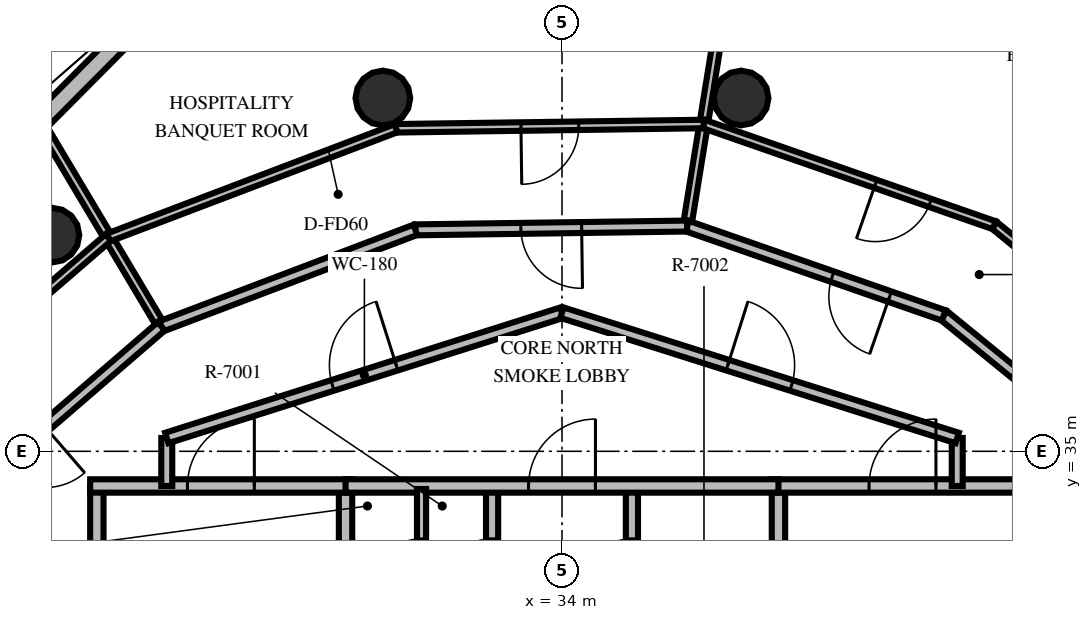
"""IFC4 building model, lengths in metres.
Left out: names, types, materials, properties, quantities, classifications, styles, units other than length and angle.
Written with IfcOpenShell. Run it as: python <this file> out.ifc"""

import sys

from ifc_helpers import new_model, si_unit, direction, frame, frame_2d, origin, origin_2d, place, context, subcontext, project, spatial, rectangle, circle, extrude, element, fill, save


model = new_model("IFC4")
c1 = context("Model", 3, precision=1e-05, world=origin(), true_north=direction((0.0, 1.0)))
c2 = subcontext(c1, "Body", "Model", "MODEL_VIEW")
j1 = project(units=[si_unit("LENGTHUNIT", "METRE"), si_unit("PLANEANGLEUNIT", "RADIAN")], contexts=[c1])
p1 = place(None, origin())
s1 = spatial("IfcSite", under=j1, at=p1, CompositionType="ELEMENT")
p2 = place(p1, origin())
s2 = spatial("IfcBuilding", under=s1, at=p2, CompositionType="ELEMENT")
p3 = place(p2, frame((0.0, 0.0, 280.8)))
s3 = spatial("IfcBuildingStorey", under=s2, at=p3, CompositionType="ELEMENT", Elevation=280.8)
for number, where, z_axis, x_axis in (
    (1, (36.946, 40.81, 0.0), (0.0, 0.0, 1.0), (1.0, 0.0, 0.0)),
    (2, (31.054, 40.81, 0.0), (0.0, 0.0, 1.0), (1.0, 0.0, 0.0)),
    (3, (25.611, 38.555, 0.0), (0.0, 0.0, 1.0), (1.0, 0.0, 0.0)),
):
    element("IfcColumn", number, at=place(p3, frame(where, z_axis=z_axis, x_axis=x_axis)), inside=s3, PredefinedType="COLUMN", context=c2, shape_type="SweptSolid", body=[
        extrude(circle(Radius=0.45, at=origin_2d()), origin(), (0.0, 0.0, 1.0), 3.6),
    ])
p4 = place(p3, frame((26.951, 41.968, 0.0), z_axis=(0.0, 0.0, 1.0), x_axis=(-0.704528696966, -0.709675499895, 0.0)))
e4 = element("IfcWall", 4, at=p4, inside=s3, PredefinedType="SOLIDWALL", context=c2, shape_type="SweptSolid", body=[
    extrude(rectangle(XDim=7.115, YDim=0.3, at=frame_2d((3.558, 0.0))), origin(), (0.0, 0.0, 1.0), 2.76),
])
p5 = place(p4, frame((2.508, 0.0, 0.8)))
e5 = element("IfcOpeningElement", 5, at=p5, cuts=e4, PredefinedType="OPENING", context=c2, shape_type="SweptSolid", body=[
    extrude(rectangle(XDim=2.1, YDim=1.85, at=frame_2d((1.05, 0.925))), frame((0.0, 0.16, 0.0), z_axis=(0.0, -1.0, 0.0), x_axis=(1.0, 0.0, 0.0)), (0.0, 0.0, 1.0), 0.32),
])
p6 = place(p3, frame((26.35, 30.05, 0.0), z_axis=(0.0, 0.0, 1.0), x_axis=(0.0, 1.0, 0.0)))
e6 = element("IfcWall", 6, at=p6, inside=s3, PredefinedType="SOLIDWALL", context=c2, shape_type="SweptSolid", body=[
    extrude(rectangle(XDim=4.38, YDim=0.22, at=frame_2d((2.19, 0.0))), origin(), (0.0, 0.0, 1.0), 2.46),
])
p7 = place(p3, frame((30.44, 30.05, 0.0), z_axis=(0.0, 0.0, 1.0), x_axis=(0.0, 1.0, 0.0)))
e7 = element("IfcWall", 7, at=p7, inside=s3, PredefinedType="SOLIDWALL", context=c2, shape_type="SweptSolid", body=[
    extrude(rectangle(XDim=4.38, YDim=0.22, at=frame_2d((2.19, 0.0))), origin(), (0.0, 0.0, 1.0), 2.46),
])
p8 = place(p7, frame((0.8, 0.0, 0.0)))
e8 = element("IfcOpeningElement", 8, at=p8, cuts=e7, PredefinedType="OPENING", context=c2, shape_type="SweptSolid", body=[
    extrude(rectangle(XDim=1.05, YDim=2.1, at=frame_2d((0.525, 1.05))), frame((0.0, 0.12, 0.0), z_axis=(0.0, -1.0, 0.0), x_axis=(1.0, 0.0, 0.0)), (0.0, 0.0, 1.0), 0.24),
])
p9 = place(p3, frame((26.24, 34.43, 0.0), z_axis=(0.0, 0.0, 1.0), x_axis=(1.0, 0.0, 0.0)))
e9 = element("IfcWall", 9, at=p9, inside=s3, PredefinedType="SOLIDWALL", context=c2, shape_type="SweptSolid", body=[
    extrude(rectangle(XDim=4.31, YDim=0.22, at=frame_2d((2.155, 0.0))), origin(), (0.0, 0.0, 1.0), 2.46),
])
p10 = place(p9, frame((1.6, 0.0, 0.0)))
e10 = element("IfcOpeningElement", 10, at=p10, cuts=e9, PredefinedType="OPENING", context=c2, shape_type="SweptSolid", body=[
    extrude(rectangle(XDim=1.1, YDim=2.15, at=frame_2d((0.55, 1.075))), frame((0.0, 0.12, 0.0), z_axis=(0.0, -1.0, 0.0), x_axis=(1.0, 0.0, 0.0)), (0.0, 0.0, 1.0), 0.24),
])
p11 = place(p3, frame((32.85, 30.05, 0.0), z_axis=(0.0, 0.0, 1.0), x_axis=(0.0, 1.0, 0.0)))
e11 = element("IfcWall", 11, at=p11, inside=s3, PredefinedType="SOLIDWALL", context=c2, shape_type="SweptSolid", body=[
    extrude(rectangle(XDim=4.38, YDim=0.2, at=frame_2d((2.19, 0.0))), origin(), (0.0, 0.0, 1.0), 2.46),
])
p12 = place(p11, frame((2.65, 0.0, 0.0)))
e12 = element("IfcOpeningElement", 12, at=p12, cuts=e11, PredefinedType="OPENING", context=c2, shape_type="SweptSolid", body=[
    extrude(rectangle(XDim=0.86, YDim=2.05, at=frame_2d((0.43, 1.025))), frame((0.0, 0.11, 0.0), z_axis=(0.0, -1.0, 0.0), x_axis=(1.0, 0.0, 0.0)), (0.0, 0.0, 1.0), 0.22),
])
p13 = place(p3, frame((37.56, 30.05, 0.0), z_axis=(0.0, 0.0, 1.0), x_axis=(0.0, 1.0, 0.0)))
e13 = element("IfcWall", 13, at=p13, inside=s3, PredefinedType="SOLIDWALL", context=c2, shape_type="SweptSolid", body=[
    extrude(rectangle(XDim=4.38, YDim=0.22, at=frame_2d((2.19, 0.0))), origin(), (0.0, 0.0, 1.0), 2.46),
])
p14 = place(p13, frame((0.8, 0.0, 0.0)))
e14 = element("IfcOpeningElement", 14, at=p14, cuts=e13, PredefinedType="OPENING", context=c2, shape_type="SweptSolid", body=[
    extrude(rectangle(XDim=1.05, YDim=2.1, at=frame_2d((0.525, 1.05))), frame((0.0, 0.12, 0.0), z_axis=(0.0, -1.0, 0.0), x_axis=(1.0, 0.0, 0.0)), (0.0, 0.0, 1.0), 0.24),
])
p15 = place(p3, frame((37.45, 34.43, 0.0), z_axis=(0.0, 0.0, 1.0), x_axis=(1.0, 0.0, 0.0)))
e15 = element("IfcWall", 15, at=p15, inside=s3, PredefinedType="SOLIDWALL", context=c2, shape_type="SweptSolid", body=[
    extrude(rectangle(XDim=4.31, YDim=0.22, at=frame_2d((2.155, 0.0))), origin(), (0.0, 0.0, 1.0), 2.46),
])
p16 = place(p15, frame((1.6, 0.0, 0.0)))
e16 = element("IfcOpeningElement", 16, at=p16, cuts=e15, PredefinedType="OPENING", context=c2, shape_type="SweptSolid", body=[
    extrude(rectangle(XDim=1.1, YDim=2.15, at=frame_2d((0.55, 1.075))), frame((0.0, 0.12, 0.0), z_axis=(0.0, -1.0, 0.0), x_axis=(1.0, 0.0, 0.0)), (0.0, 0.0, 1.0), 0.24),
])
p17 = place(p3, frame((35.15, 30.05, 0.0), z_axis=(0.0, 0.0, 1.0), x_axis=(0.0, 1.0, 0.0)))
e17 = element("IfcWall", 17, at=p17, inside=s3, PredefinedType="SOLIDWALL", context=c2, shape_type="SweptSolid", body=[
    extrude(rectangle(XDim=4.38, YDim=0.2, at=frame_2d((2.19, 0.0))), origin(), (0.0, 0.0, 1.0), 2.46),
])
p18 = place(p17, frame((2.65, 0.0, 0.0)))
e18 = element("IfcOpeningElement", 18, at=p18, cuts=e17, PredefinedType="OPENING", context=c2, shape_type="SweptSolid", body=[
    extrude(rectangle(XDim=0.86, YDim=2.05, at=frame_2d((0.43, 1.025))), frame((0.0, 0.11, 0.0), z_axis=(0.0, -1.0, 0.0), x_axis=(1.0, 0.0, 0.0)), (0.0, 0.0, 1.0), 0.22),
])
p19 = place(p3, frame((30.44, 34.43, 0.0), z_axis=(0.0, 0.0, 1.0), x_axis=(1.0, 0.0, 0.0)))
e19 = element("IfcWall", 19, at=p19, inside=s3, PredefinedType="SOLIDWALL", context=c2, shape_type="SweptSolid", body=[
    extrude(rectangle(XDim=7.12, YDim=0.22, at=frame_2d((3.56, 0.0))), origin(), (0.0, 0.0, 1.0), 2.46),
])
p20 = place(p19, frame((3.01, 0.0, 0.0)))
e20 = element("IfcOpeningElement", 20, at=p20, cuts=e19, PredefinedType="OPENING", context=c2, shape_type="SweptSolid", body=[
    extrude(rectangle(XDim=1.1, YDim=2.15, at=frame_2d((0.55, 1.075))), frame((0.0, 0.12, 0.0), z_axis=(0.0, -1.0, 0.0), x_axis=(1.0, 0.0, 0.0)), (0.0, 0.0, 1.0), 0.24),
])
p21 = place(p3, frame((31.69, 32.05, 0.0), z_axis=(0.0, 0.0, 1.0), x_axis=(0.0, 1.0, 0.0)))
e21 = element("IfcWall", 21, at=p21, inside=s3, PredefinedType="PARTITIONING", context=c2, shape_type="SweptSolid", body=[
    extrude(rectangle(XDim=2.33, YDim=0.15, at=frame_2d((1.165, 0.0))), origin(), (0.0, 0.0, 1.0), 2.46),
])
p22 = place(p21, frame((0.65, 0.0, 0.0)))
e22 = element("IfcOpeningElement", 22, at=p22, cuts=e21, PredefinedType="OPENING", context=c2, shape_type="SweptSolid", body=[
    extrude(rectangle(XDim=0.86, YDim=2.05, at=frame_2d((0.43, 1.025))), frame((0.0, 0.085, 0.0), z_axis=(0.0, -1.0, 0.0), x_axis=(1.0, 0.0, 0.0)), (0.0, 0.0, 1.0), 0.17),
])
for number, where, z_axis, x_axis in (
    (23, (27.5, 34.43, 0.0), (0.0, 0.0, 1.0), (0.0, 1.0, 0.0)),
    (24, (40.5, 35.219, 0.0), (0.0, 0.0, 1.0), (0.0, -1.0, 0.0)),
):
    element("IfcWall", number, at=place(p3, frame(where, z_axis=z_axis, x_axis=x_axis)), inside=s3, PredefinedType="PARTITIONING", context=c2, shape_type="SweptSolid", body=[
        extrude(rectangle(XDim=0.789, YDim=0.18, at=frame_2d((0.395, 0.0))), origin(), (0.0, 0.0, 1.0), 2.46),
    ])
p23 = place(p3, frame((27.5, 35.219, 0.0), z_axis=(0.0, 0.0, 1.0), x_axis=(0.953228121756, 0.302251795518, 0.0)))
e25 = element("IfcWall", 25, at=p23, inside=s3, PredefinedType="PARTITIONING", context=c2, shape_type="SweptSolid", body=[
    extrude(rectangle(XDim=6.819, YDim=0.18, at=frame_2d((3.409, 0.0))), origin(), (0.0, 0.0, 1.0), 2.46),
])
p24 = place(p23, frame((2.86, 0.0, 0.0)))
e26 = element("IfcOpeningElement", 26, at=p24, cuts=e25, PredefinedType="OPENING", context=c2, shape_type="SweptSolid", body=[
    extrude(rectangle(XDim=1.1, YDim=2.15, at=frame_2d((0.55, 1.075))), frame((0.0, 0.1, 0.0), z_axis=(0.0, -1.0, 0.0), x_axis=(1.0, 0.0, 0.0)), (0.0, 0.0, 1.0), 0.2),
])
p25 = place(p3, frame((34.0, 37.28, 0.0), z_axis=(0.0, 0.0, 1.0), x_axis=(0.953228121756, -0.302251795518, 0.0)))
e27 = element("IfcWall", 27, at=p25, inside=s3, PredefinedType="PARTITIONING", context=c2, shape_type="SweptSolid", body=[
    extrude(rectangle(XDim=6.819, YDim=0.18, at=frame_2d((3.409, 0.0))), origin(), (0.0, 0.0, 1.0), 2.46),
])
p26 = place(p25, frame((2.86, 0.0, 0.0)))
e28 = element("IfcOpeningElement", 28, at=p26, cuts=e27, PredefinedType="OPENING", context=c2, shape_type="SweptSolid", body=[
    extrude(rectangle(XDim=1.1, YDim=2.15, at=frame_2d((0.55, 1.075))), frame((0.0, 0.1, 0.0), z_axis=(0.0, -1.0, 0.0), x_axis=(1.0, 0.0, 0.0)), (0.0, 0.0, 1.0), 0.2),
])
p27 = place(p3, frame((36.058, 38.704, 0.0), z_axis=(0.0, 0.0, 1.0), x_axis=(0.159896328627, 0.987133812657, 0.0)))
e29 = element("IfcWall", 29, at=p27, inside=s3, PredefinedType="PARTITIONING", context=c2, shape_type="SweptSolid", body=[
    extrude(rectangle(XDim=7.318, YDim=0.14, at=frame_2d((3.659, 0.0))), origin(), (0.0, 0.0, 1.0), 2.46),
])
p28 = place(p3, frame((43.742, 34.409, 0.0), z_axis=(0.0, 0.0, 1.0), x_axis=(-0.774907966297, 0.632074080919, 0.0)))
e30 = element("IfcWall", 30, at=p28, inside=s3, PredefinedType="PARTITIONING", context=c2, shape_type="SweptSolid", body=[
    extrude(rectangle(XDim=4.47, YDim=0.18, at=frame_2d((2.235, 0.0))), origin(), (0.0, 0.0, 1.0), 2.46),
])
p29 = place(p3, frame((40.279, 37.235, 0.0), z_axis=(0.0, 0.0, 1.0), x_axis=(-0.944393587755, 0.328817200595, 0.0)))
e31 = element("IfcWall", 31, at=p29, inside=s3, PredefinedType="PARTITIONING", context=c2, shape_type="SweptSolid", body=[
    extrude(rectangle(XDim=4.47, YDim=0.18, at=frame_2d((2.235, 0.0))), origin(), (0.0, 0.0, 1.0), 2.46),
])
p30 = place(p29, frame((0.942, 0.0, 0.0)))
e32 = element("IfcOpeningElement", 32, at=p30, cuts=e31, PredefinedType="OPENING", context=c2, shape_type="SweptSolid", body=[
    extrude(rectangle(XDim=1.0, YDim=2.15, at=frame_2d((0.5, 1.075))), frame((0.0, 0.1, 0.0), z_axis=(0.0, -1.0, 0.0), x_axis=(1.0, 0.0, 0.0)), (0.0, 0.0, 1.0), 0.2),
])
p31 = place(p3, frame((45.029, 35.52, 0.0), z_axis=(0.0, 0.0, 1.0), x_axis=(-0.774921612032, 0.6320573512, 0.0)))
e33 = element("IfcWall", 33, at=p31, inside=s3, PredefinedType="PARTITIONING", context=c2, shape_type="SweptSolid", body=[
    extrude(rectangle(XDim=5.06, YDim=0.14, at=frame_2d((2.53, 0.0))), origin(), (0.0, 0.0, 1.0), 2.46),
])
p32 = place(p3, frame((41.108, 38.719, 0.0), z_axis=(0.0, 0.0, 1.0), x_axis=(-0.944376965855, 0.328864936354, 0.0)))
e34 = element("IfcWall", 34, at=p32, inside=s3, PredefinedType="PARTITIONING", context=c2, shape_type="SweptSolid", body=[
    extrude(rectangle(XDim=5.06, YDim=0.14, at=frame_2d((2.53, 0.0))), origin(), (0.0, 0.0, 1.0), 2.46),
])
p33 = place(p32, frame((1.117, 0.0, 0.0)))
e35 = element("IfcOpeningElement", 35, at=p33, cuts=e34, PredefinedType="OPENING", context=c2, shape_type="SweptSolid", body=[
    extrude(rectangle(XDim=0.95, YDim=2.15, at=frame_2d((0.475, 1.075))), frame((0.0, 0.08, 0.0), z_axis=(0.0, -1.0, 0.0), x_axis=(1.0, 0.0, 0.0)), (0.0, 0.0, 1.0), 0.16),
])
p34 = place(p3, frame((27.41, 37.055, 0.0), z_axis=(0.0, 0.0, 1.0), x_axis=(-0.512015892625, 0.858975975042, 0.0)))
e36 = element("IfcWall", 36, at=p34, inside=s3, PredefinedType="PARTITIONING", context=c2, shape_type="SweptSolid", body=[
    extrude(rectangle(XDim=4.13, YDim=0.14, at=frame_2d((2.065, 0.0))), origin(), (0.0, 0.0, 1.0), 2.46),
])
p35 = place(p3, frame((36.058, 38.704, 0.0), z_axis=(0.0, 0.0, 1.0), x_axis=(-0.99990299363, -0.013928507778, 0.0)))
e37 = element("IfcWall", 37, at=p35, inside=s3, PredefinedType="PARTITIONING", context=c2, shape_type="SweptSolid", body=[
    extrude(rectangle(XDim=4.47, YDim=0.18, at=frame_2d((2.235, 0.0))), origin(), (0.0, 0.0, 1.0), 2.46),
])
p36 = place(p35, frame((1.735, 0.0, 0.0)))
e38 = element("IfcOpeningElement", 38, at=p36, cuts=e37, PredefinedType="OPENING", context=c2, shape_type="SweptSolid", body=[
    extrude(rectangle(XDim=1.0, YDim=2.15, at=frame_2d((0.5, 1.075))), frame((0.0, 0.1, 0.0), z_axis=(0.0, -1.0, 0.0), x_axis=(1.0, 0.0, 0.0)), (0.0, 0.0, 1.0), 0.2),
])
p37 = place(p3, frame((31.588, 38.642, 0.0), z_axis=(0.0, 0.0, 1.0), x_axis=(-0.934814409171, -0.355136622169, 0.0)))
e39 = element("IfcWall", 39, at=p37, inside=s3, PredefinedType="PARTITIONING", context=c2, shape_type="SweptSolid", body=[
    extrude(rectangle(XDim=4.47, YDim=0.18, at=frame_2d((2.235, 0.0))), origin(), (0.0, 0.0, 1.0), 2.46),
])
p38 = place(p3, frame((36.33, 40.383, 0.0), z_axis=(0.0, 0.0, 1.0), x_axis=(-0.999902780096, -0.013943828578, 0.0)))
e40 = element("IfcWall", 40, at=p38, inside=s3, PredefinedType="PARTITIONING", context=c2, shape_type="SweptSolid", body=[
    extrude(rectangle(XDim=5.06, YDim=0.14, at=frame_2d((2.53, 0.0))), origin(), (0.0, 0.0, 1.0), 2.46),
])
p39 = place(p38, frame((2.055, 0.0, 0.0)))
e41 = element("IfcOpeningElement", 41, at=p39, cuts=e40, PredefinedType="OPENING", context=c2, shape_type="SweptSolid", body=[
    extrude(rectangle(XDim=0.95, YDim=2.15, at=frame_2d((0.475, 1.075))), frame((0.0, 0.08, 0.0), z_axis=(0.0, -1.0, 0.0), x_axis=(1.0, 0.0, 0.0)), (0.0, 0.0, 1.0), 0.16),
])
p40 = place(p3, frame((31.27, 40.312, 0.0), z_axis=(0.0, 0.0, 1.0), x_axis=(-0.934813695118, -0.355138501743, 0.0)))
e42 = element("IfcWall", 42, at=p40, inside=s3, PredefinedType="PARTITIONING", context=c2, shape_type="SweptSolid", body=[
    extrude(rectangle(XDim=5.06, YDim=0.14, at=frame_2d((2.53, 0.0))), origin(), (0.0, 0.0, 1.0), 2.46),
])
p41 = place(p3, frame((27.41, 37.055, 0.0), z_axis=(0.0, 0.0, 1.0), x_axis=(-0.756992481262, -0.653423586438, 0.0)))
e43 = element("IfcWall", 43, at=p41, inside=s3, PredefinedType="PARTITIONING", context=c2, shape_type="SweptSolid", body=[
    extrude(rectangle(XDim=4.469, YDim=0.18, at=frame_2d((2.235, 0.0))), origin(), (0.0, 0.0, 1.0), 2.46),
])
p42 = place(p41, frame((2.527, 0.0, 0.0)))
e44 = element("IfcOpeningElement", 44, at=p42, cuts=e43, PredefinedType="OPENING", context=c2, shape_type="SweptSolid", body=[
    extrude(rectangle(XDim=1.0, YDim=2.15, at=frame_2d((0.5, 1.075))), frame((0.0, 0.1, 0.0), z_axis=(0.0, -1.0, 0.0), x_axis=(1.0, 0.0, 0.0)), (0.0, 0.0, 1.0), 0.2),
])
p43 = place(p3, frame((26.54, 38.515, 0.0), z_axis=(0.0, 0.0, 1.0), x_axis=(-0.757024760465, -0.653386189051, 0.0)))
e45 = element("IfcWall", 45, at=p43, inside=s3, PredefinedType="PARTITIONING", context=c2, shape_type="SweptSolid", body=[
    extrude(rectangle(XDim=5.06, YDim=0.14, at=frame_2d((2.53, 0.0))), origin(), (0.0, 0.0, 1.0), 2.46),
])
p44 = place(p43, frame((2.992, 0.0, 0.0)))
e46 = element("IfcOpeningElement", 46, at=p44, cuts=e45, PredefinedType="OPENING", context=c2, shape_type="SweptSolid", body=[
    extrude(rectangle(XDim=0.95, YDim=2.15, at=frame_2d((0.475, 1.075))), frame((0.0, 0.08, 0.0), z_axis=(0.0, -1.0, 0.0), x_axis=(1.0, 0.0, 0.0)), (0.0, 0.0, 1.0), 0.16),
])
p45 = place(p10, origin())
e47 = element("IfcDoor", 47, at=p45, inside=s3, OperationType="SINGLE_SWING_RIGHT", PredefinedType="DOOR", context=c2, shape_type="SweptSolid", body=[
    extrude(rectangle(XDim=1.1, YDim=2.15, at=frame_2d((0.55, 1.075))), frame((0.0, 0.025, 0.0), z_axis=(0.0, -1.0, 0.0), x_axis=(1.0, 0.0, 0.0)), (0.0, 0.0, 1.0), 0.05),
])
fill(e10, e47)
p46 = place(p12, origin())
e48 = element("IfcDoor", 48, at=p46, inside=s3, OperationType="SINGLE_SWING_LEFT", PredefinedType="TRAPDOOR", context=c2, shape_type="SweptSolid", body=[
    extrude(rectangle(XDim=0.86, YDim=2.05, at=frame_2d((0.43, 1.025))), frame((0.0, 0.025, 0.0), z_axis=(0.0, -1.0, 0.0), x_axis=(1.0, 0.0, 0.0)), (0.0, 0.0, 1.0), 0.05),
])
fill(e12, e48)
p47 = place(p16, origin())
e49 = element("IfcDoor", 49, at=p47, inside=s3, OperationType="SINGLE_SWING_RIGHT", PredefinedType="DOOR", context=c2, shape_type="SweptSolid", body=[
    extrude(rectangle(XDim=1.1, YDim=2.15, at=frame_2d((0.55, 1.075))), frame((0.0, 0.025, 0.0), z_axis=(0.0, -1.0, 0.0), x_axis=(1.0, 0.0, 0.0)), (0.0, 0.0, 1.0), 0.05),
])
fill(e16, e49)
p48 = place(p18, origin())
e50 = element("IfcDoor", 50, at=p48, inside=s3, OperationType="SINGLE_SWING_LEFT", PredefinedType="TRAPDOOR", context=c2, shape_type="SweptSolid", body=[
    extrude(rectangle(XDim=0.86, YDim=2.05, at=frame_2d((0.43, 1.025))), frame((0.0, 0.025, 0.0), z_axis=(0.0, -1.0, 0.0), x_axis=(1.0, 0.0, 0.0)), (0.0, 0.0, 1.0), 0.05),
])
fill(e18, e50)
p49 = place(p20, origin())
e51 = element("IfcDoor", 51, at=p49, inside=s3, OperationType="SINGLE_SWING_RIGHT", PredefinedType="DOOR", context=c2, shape_type="SweptSolid", body=[
    extrude(rectangle(XDim=1.1, YDim=2.15, at=frame_2d((0.55, 1.075))), frame((0.0, 0.025, 0.0), z_axis=(0.0, -1.0, 0.0), x_axis=(1.0, 0.0, 0.0)), (0.0, 0.0, 1.0), 0.05),
])
fill(e20, e51)
p50 = place(p22, origin())
e52 = element("IfcDoor", 52, at=p50, inside=s3, OperationType="SINGLE_SWING_LEFT", PredefinedType="TRAPDOOR", context=c2, shape_type="SweptSolid", body=[
    extrude(rectangle(XDim=0.86, YDim=2.05, at=frame_2d((0.43, 1.025))), frame((0.0, 0.025, 0.0), z_axis=(0.0, -1.0, 0.0), x_axis=(1.0, 0.0, 0.0)), (0.0, 0.0, 1.0), 0.05),
])
fill(e22, e52)
p51 = place(p24, origin())
e53 = element("IfcDoor", 53, at=p51, inside=s3, OperationType="SINGLE_SWING_RIGHT", PredefinedType="DOOR", context=c2, shape_type="SweptSolid", body=[
    extrude(rectangle(XDim=1.1, YDim=2.15, at=frame_2d((0.55, 1.075))), frame((0.0, 0.025, 0.0), z_axis=(0.0, -1.0, 0.0), x_axis=(1.0, 0.0, 0.0)), (0.0, 0.0, 1.0), 0.05),
])
fill(e26, e53)
p52 = place(p26, origin())
e54 = element("IfcDoor", 54, at=p52, inside=s3, OperationType="SINGLE_SWING_LEFT", PredefinedType="DOOR", context=c2, shape_type="SweptSolid", body=[
    extrude(rectangle(XDim=1.1, YDim=2.15, at=frame_2d((0.55, 1.075))), frame((0.0, 0.025, 0.0), z_axis=(0.0, -1.0, 0.0), x_axis=(1.0, 0.0, 0.0)), (0.0, 0.0, 1.0), 0.05),
])
fill(e28, e54)
p53 = place(p30, origin())
e55 = element("IfcDoor", 55, at=p53, inside=s3, OperationType="SINGLE_SWING_LEFT", PredefinedType="DOOR", context=c2, shape_type="SweptSolid", body=[
    extrude(rectangle(XDim=1.0, YDim=2.15, at=frame_2d((0.5, 1.075))), frame((0.0, 0.025, 0.0), z_axis=(0.0, -1.0, 0.0), x_axis=(1.0, 0.0, 0.0)), (0.0, 0.0, 1.0), 0.05),
])
fill(e32, e55)
p54 = place(p33, origin())
e56 = element("IfcDoor", 56, at=p54, inside=s3, OperationType="SINGLE_SWING_RIGHT", PredefinedType="DOOR", context=c2, shape_type="SweptSolid", body=[
    extrude(rectangle(XDim=0.95, YDim=2.15, at=frame_2d((0.475, 1.075))), frame((0.0, 0.025, 0.0), z_axis=(0.0, -1.0, 0.0), x_axis=(1.0, 0.0, 0.0)), (0.0, 0.0, 1.0), 0.05),
])
fill(e35, e56)
p55 = place(p36, origin())
e57 = element("IfcDoor", 57, at=p55, inside=s3, OperationType="SINGLE_SWING_LEFT", PredefinedType="DOOR", context=c2, shape_type="SweptSolid", body=[
    extrude(rectangle(XDim=1.0, YDim=2.15, at=frame_2d((0.5, 1.075))), frame((0.0, 0.025, 0.0), z_axis=(0.0, -1.0, 0.0), x_axis=(1.0, 0.0, 0.0)), (0.0, 0.0, 1.0), 0.05),
])
fill(e38, e57)
p56 = place(p39, origin())
e58 = element("IfcDoor", 58, at=p56, inside=s3, OperationType="SINGLE_SWING_RIGHT", PredefinedType="DOOR", context=c2, shape_type="SweptSolid", body=[
    extrude(rectangle(XDim=0.95, YDim=2.15, at=frame_2d((0.475, 1.075))), frame((0.0, 0.025, 0.0), z_axis=(0.0, -1.0, 0.0), x_axis=(1.0, 0.0, 0.0)), (0.0, 0.0, 1.0), 0.05),
])
fill(e41, e58)
save(model, sys.argv[1])
